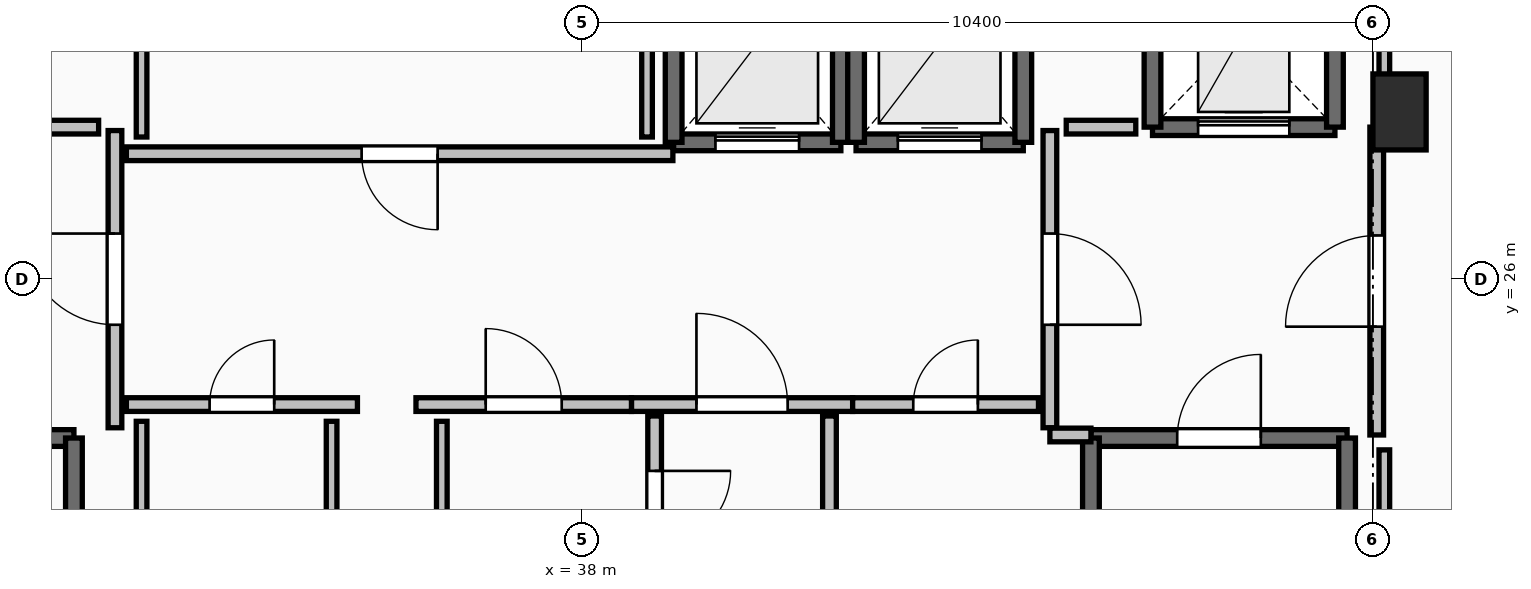
"""IFC4 building model, lengths in metres.
Left out: names, types, materials, properties, quantities, classifications, styles, units other than length and angle.
Written with IfcOpenShell. Run it as: python <this file> out.ifc"""

import sys

from ifc_helpers import new_model, si_unit, direction, frame, frame_2d, origin, origin_2d, place, context, subcontext, project, spatial, rectangle, extrude, element, fill, save


model = new_model("IFC4")
c1 = context("Model", 3, precision=1e-05, world=origin(), true_north=direction((0.0, 1.0)))
c2 = subcontext(c1, "Body", "Model", "MODEL_VIEW")
j1 = project(units=[si_unit("LENGTHUNIT", "METRE"), si_unit("PLANEANGLEUNIT", "RADIAN")], contexts=[c1])
p1 = place(None, origin())
s1 = spatial("IfcSite", under=j1, at=p1, CompositionType="ELEMENT")
p2 = place(p1, origin())
s2 = spatial("IfcBuilding", under=s1, at=p2, CompositionType="ELEMENT")
p3 = place(p2, frame((0.0, 0.0, 269.75)))
s3 = spatial("IfcBuildingStorey", under=s2, at=p3, CompositionType="ELEMENT", Elevation=269.75)
p4 = place(p3, frame((48.75, 28.2, 0.0), z_axis=(0.0, 0.0, 1.0), x_axis=(1.0, 0.0, 0.0)))
e1 = element("IfcColumn", 1, at=p4, inside=s3, PredefinedType="PILASTER", context=c2, shape_type="SweptSolid", body=[
    extrude(rectangle(XDim=0.7, YDim=1.0, at=origin_2d()), origin(), (0.0, 0.0, 1.0), 3.55),
])
p5 = place(p3, frame((27.94, 23.91, 0.0), z_axis=(0.0, 0.0, 1.0), x_axis=(1.0, 0.0, 0.0)))
e2 = element("IfcWall", 2, at=p5, inside=s3, PredefinedType="SOLIDWALL", context=c2, shape_type="SweptSolid", body=[
    extrude(rectangle(XDim=3.37, YDim=0.22, at=frame_2d((1.685, 0.0))), origin(), (0.0, 0.0, 1.0), 3.29),
])
p6 = place(p5, frame((1.135, 0.0, 0.0)))
e3 = element("IfcOpeningElement", 3, at=p6, cuts=e2, PredefinedType="OPENING", context=c2, shape_type="SweptSolid", body=[
    extrude(rectangle(XDim=1.1, YDim=2.15, at=frame_2d((0.55, 1.075))), frame((0.0, 0.125, 0.0), z_axis=(0.0, -1.0, 0.0), x_axis=(1.0, 0.0, 0.0)), (0.0, 0.0, 1.0), 0.25),
])
p7 = place(p3, frame((31.31, 23.91, 0.0), z_axis=(0.0, 0.0, 1.0), x_axis=(0.0, -1.0, 0.0)))
e4 = element("IfcWall", 4, at=p7, inside=s3, PredefinedType="SOLIDWALL", context=c2, shape_type="SweptSolid", body=[
    extrude(rectangle(XDim=7.42, YDim=0.22, at=frame_2d((3.71, 0.0))), origin(), (0.0, 0.0, 1.0), 3.29),
])
p8 = place(p3, frame((44.69, 23.91, 0.0), z_axis=(0.0, 0.0, 1.0), x_axis=(1.0, 0.0, 0.0)))
e5 = element("IfcWall", 5, at=p8, inside=s3, PredefinedType="SOLIDWALL", context=c2, shape_type="SweptSolid", body=[
    extrude(rectangle(XDim=3.37, YDim=0.22, at=frame_2d((1.685, 0.0))), origin(), (0.0, 0.0, 1.0), 3.29),
])
p9 = place(p8, frame((1.135, 0.0, 0.0)))
e6 = element("IfcOpeningElement", 6, at=p9, cuts=e5, PredefinedType="OPENING", context=c2, shape_type="SweptSolid", body=[
    extrude(rectangle(XDim=1.1, YDim=2.15, at=frame_2d((0.55, 1.075))), frame((0.0, 0.125, 0.0), z_axis=(0.0, -1.0, 0.0), x_axis=(1.0, 0.0, 0.0)), (0.0, 0.0, 1.0), 0.25),
])
for number, where, z_axis, x_axis in (
    (7, (48.06, 23.91, 0.0), (0.0, 0.0, 1.0), (0.0, -1.0, 0.0)),
    (8, (44.69, 16.49, 0.0), (0.0, 0.0, 1.0), (0.0, 1.0, 0.0)),
):
    element("IfcWall", number, at=place(p3, frame(where, z_axis=z_axis, x_axis=x_axis)), inside=s3, PredefinedType="SOLIDWALL", context=c2, shape_type="SweptSolid", body=[
        extrude(rectangle(XDim=7.42, YDim=0.22, at=frame_2d((3.71, 0.0))), origin(), (0.0, 0.0, 1.0), 3.29),
    ])
p10 = place(p3, frame((39.2, 27.8, 0.0), z_axis=(0.0, 0.0, 1.0), x_axis=(1.0, 0.0, 0.0)))
e9 = element("IfcWall", 9, at=p10, inside=s3, PredefinedType="SOLIDWALL", context=c2, shape_type="SweptSolid", body=[
    extrude(rectangle(XDim=2.2, YDim=0.22, at=frame_2d((1.1, 0.0))), origin(), (0.0, 0.0, 1.0), 3.29),
])
p11 = place(p10, frame((0.55, 0.0, 0.0)))
e10 = element("IfcOpeningElement", 10, at=p11, cuts=e9, PredefinedType="OPENING", context=c2, shape_type="SweptSolid", body=[
    extrude(rectangle(XDim=1.1, YDim=2.2, at=frame_2d((0.55, 1.1))), frame((0.0, 0.125, 0.0), z_axis=(0.0, -1.0, 0.0), x_axis=(1.0, 0.0, 0.0)), (0.0, 0.0, 1.0), 0.25),
])
for number, where, z_axis, x_axis in (
    (11, (41.4, 27.8, 0.0), (0.0, 0.0, 1.0), (0.0, 1.0, 0.0)),
    (12, (39.2, 30.4, 0.0), (0.0, 0.0, 1.0), (0.0, -1.0, 0.0)),
):
    element("IfcWall", number, at=place(p3, frame(where, z_axis=z_axis, x_axis=x_axis)), inside=s3, PredefinedType="SOLIDWALL", context=c2, shape_type="SweptSolid", body=[
        extrude(rectangle(XDim=2.6, YDim=0.22, at=frame_2d((1.3, 0.0))), origin(), (0.0, 0.0, 1.0), 3.29),
    ])
p12 = place(p3, frame((41.6, 27.8, 0.0), z_axis=(0.0, 0.0, 1.0), x_axis=(1.0, 0.0, 0.0)))
e13 = element("IfcWall", 13, at=p12, inside=s3, PredefinedType="SOLIDWALL", context=c2, shape_type="SweptSolid", body=[
    extrude(rectangle(XDim=2.2, YDim=0.22, at=frame_2d((1.1, 0.0))), origin(), (0.0, 0.0, 1.0), 3.29),
])
p13 = place(p12, frame((0.55, 0.0, 0.0)))
e14 = element("IfcOpeningElement", 14, at=p13, cuts=e13, PredefinedType="OPENING", context=c2, shape_type="SweptSolid", body=[
    extrude(rectangle(XDim=1.1, YDim=2.2, at=frame_2d((0.55, 1.1))), frame((0.0, 0.125, 0.0), z_axis=(0.0, -1.0, 0.0), x_axis=(1.0, 0.0, 0.0)), (0.0, 0.0, 1.0), 0.25),
])
for number, where, z_axis, x_axis in (
    (15, (43.8, 27.8, 0.0), (0.0, 0.0, 1.0), (0.0, 1.0, 0.0)),
    (16, (41.6, 30.4, 0.0), (0.0, 0.0, 1.0), (0.0, -1.0, 0.0)),
):
    element("IfcWall", number, at=place(p3, frame(where, z_axis=z_axis, x_axis=x_axis)), inside=s3, PredefinedType="SOLIDWALL", context=c2, shape_type="SweptSolid", body=[
        extrude(rectangle(XDim=2.6, YDim=0.22, at=frame_2d((1.3, 0.0))), origin(), (0.0, 0.0, 1.0), 3.29),
    ])
p14 = place(p3, frame((45.5, 28.0, 0.0), z_axis=(0.0, 0.0, 1.0), x_axis=(1.0, 0.0, 0.0)))
e17 = element("IfcWall", 17, at=p14, inside=s3, PredefinedType="SHEAR", context=c2, shape_type="SweptSolid", body=[
    extrude(rectangle(XDim=2.4, YDim=0.22, at=frame_2d((1.2, 0.0))), origin(), (0.0, 0.0, 1.0), 3.29),
])
p15 = place(p14, frame((0.6, 0.0, 0.0)))
e18 = element("IfcOpeningElement", 18, at=p15, cuts=e17, PredefinedType="OPENING", context=c2, shape_type="SweptSolid", body=[
    extrude(rectangle(XDim=1.2, YDim=2.2, at=frame_2d((0.6, 1.1))), frame((0.0, 0.125, 0.0), z_axis=(0.0, -1.0, 0.0), x_axis=(1.0, 0.0, 0.0)), (0.0, 0.0, 1.0), 0.25),
])
for number, where, z_axis, x_axis in (
    (19, (47.9, 28.0, 0.0), (0.0, 0.0, 1.0), (0.0, 1.0, 0.0)),
    (20, (45.5, 30.5, 0.0), (0.0, 0.0, 1.0), (0.0, -1.0, 0.0)),
):
    element("IfcWall", number, at=place(p3, frame(where, z_axis=z_axis, x_axis=x_axis)), inside=s3, PredefinedType="SHEAR", context=c2, shape_type="SweptSolid", body=[
        extrude(rectangle(XDim=2.5, YDim=0.22, at=frame_2d((1.25, 0.0))), origin(), (0.0, 0.0, 1.0), 3.29),
    ])
p16 = place(p3, frame((31.85, 24.045, 0.0), z_axis=(0.0, 0.0, 1.0), x_axis=(0.0, 1.0, 0.0)))
e21 = element("IfcWall", 21, at=p16, inside=s3, PredefinedType="PARTITIONING", context=c2, shape_type="SweptSolid", body=[
    extrude(rectangle(XDim=3.91, YDim=0.18, at=frame_2d((1.955, 0.0))), origin(), (0.0, 0.0, 1.0), 3.29),
])
p17 = place(p16, frame((1.355, 0.0, 0.0)))
e22 = element("IfcOpeningElement", 22, at=p17, cuts=e21, PredefinedType="OPENING", context=c2, shape_type="SweptSolid", body=[
    extrude(rectangle(XDim=1.2, YDim=2.15, at=frame_2d((0.6, 1.075))), frame((0.0, 0.105, 0.0), z_axis=(0.0, -1.0, 0.0), x_axis=(1.0, 0.0, 0.0)), (0.0, 0.0, 1.0), 0.21),
])
p18 = place(p3, frame((44.15, 27.955, 0.0), z_axis=(0.0, 0.0, 1.0), x_axis=(0.0, -1.0, 0.0)))
e23 = element("IfcWall", 23, at=p18, inside=s3, PredefinedType="PARTITIONING", context=c2, shape_type="SweptSolid", body=[
    extrude(rectangle(XDim=3.91, YDim=0.18, at=frame_2d((1.955, 0.0))), origin(), (0.0, 0.0, 1.0), 3.29),
])
p19 = place(p18, frame((1.355, 0.0, 0.0)))
e24 = element("IfcOpeningElement", 24, at=p19, cuts=e23, PredefinedType="OPENING", context=c2, shape_type="SweptSolid", body=[
    extrude(rectangle(XDim=1.2, YDim=2.15, at=frame_2d((0.6, 1.075))), frame((0.0, 0.105, 0.0), z_axis=(0.0, -1.0, 0.0), x_axis=(1.0, 0.0, 0.0)), (0.0, 0.0, 1.0), 0.21),
])
p20 = place(p3, frame((44.15, 23.95, 0.0), z_axis=(0.0, 0.0, 1.0), x_axis=(1.0, 0.0, 0.0)))
e25 = element("IfcWall", 25, at=p20, inside=s3, PredefinedType="PARTITIONING", context=c2, shape_type="SweptSolid", body=[
    extrude(rectangle(XDim=0.54, YDim=0.18, at=frame_2d((0.27, 0.0))), origin(), (0.0, 0.0, 1.0), 3.29),
])
p21 = place(p3, frame((48.45, 23.95, 0.0), z_axis=(0.0, 0.0, 1.0), x_axis=(0.0, 1.0, 0.0)))
e26 = element("IfcWall", 26, at=p21, inside=s3, PredefinedType="PARTITIONING", context=c2, shape_type="SweptSolid", body=[
    extrude(rectangle(XDim=4.05, YDim=0.18, at=frame_2d((2.025, 0.0))), origin(), (0.0, 0.0, 1.0), 3.29),
])
p22 = place(p21, frame((1.425, 0.0, 0.0)))
e27 = element("IfcOpeningElement", 27, at=p22, cuts=e26, PredefinedType="OPENING", context=c2, shape_type="SweptSolid", body=[
    extrude(rectangle(XDim=1.2, YDim=2.15, at=frame_2d((0.6, 1.075))), frame((0.0, 0.105, 0.0), z_axis=(0.0, -1.0, 0.0), x_axis=(1.0, 0.0, 0.0)), (0.0, 0.0, 1.0), 0.21),
])
p23 = place(p3, frame((38.645, 24.35, 0.0), z_axis=(0.0, 0.0, 1.0), x_axis=(1.0, 0.0, 0.0)))
e28 = element("IfcWall", 28, at=p23, inside=s3, PredefinedType="PARTITIONING", context=c2, shape_type="SweptSolid", body=[
    extrude(rectangle(XDim=2.91, YDim=0.18, at=frame_2d((1.455, 0.0))), origin(), (0.0, 0.0, 1.0), 3.29),
])
p24 = place(p23, frame((0.855, 0.0, 0.0)))
e29 = element("IfcOpeningElement", 29, at=p24, cuts=e28, PredefinedType="OPENING", context=c2, shape_type="SweptSolid", body=[
    extrude(rectangle(XDim=1.2, YDim=2.15, at=frame_2d((0.6, 1.075))), frame((0.0, 0.105, 0.0), z_axis=(0.0, -1.0, 0.0), x_axis=(1.0, 0.0, 0.0)), (0.0, 0.0, 1.0), 0.21),
])
p25 = place(p3, frame((41.555, 24.35, 0.0), z_axis=(0.0, 0.0, 1.0), x_axis=(1.0, 0.0, 0.0)))
e30 = element("IfcWall", 30, at=p25, inside=s3, PredefinedType="PARTITIONING", context=c2, shape_type="SweptSolid", body=[
    extrude(rectangle(XDim=2.445, YDim=0.18, at=frame_2d((1.223, 0.0))), origin(), (0.0, 0.0, 1.0), 3.29),
])
p26 = place(p25, frame((0.798, 0.0, 0.0)))
e31 = element("IfcOpeningElement", 31, at=p26, cuts=e30, PredefinedType="OPENING", context=c2, shape_type="SweptSolid", body=[
    extrude(rectangle(XDim=0.85, YDim=2.1, at=frame_2d((0.425, 1.05))), frame((0.0, 0.105, 0.0), z_axis=(0.0, -1.0, 0.0), x_axis=(1.0, 0.0, 0.0)), (0.0, 0.0, 1.0), 0.21),
])
p27 = place(p3, frame((39.19, 27.65, 0.0), z_axis=(0.0, 0.0, 1.0), x_axis=(-1.0, 0.0, 0.0)))
e32 = element("IfcWall", 32, at=p27, inside=s3, PredefinedType="PARTITIONING", context=c2, shape_type="SweptSolid", body=[
    extrude(rectangle(XDim=7.19, YDim=0.18, at=frame_2d((3.595, 0.0))), origin(), (0.0, 0.0, 1.0), 3.29),
])
p28 = place(p27, frame((3.095, 0.0, 0.0)))
e33 = element("IfcOpeningElement", 33, at=p28, cuts=e32, PredefinedType="OPENING", context=c2, shape_type="SweptSolid", body=[
    extrude(rectangle(XDim=1.0, YDim=2.15, at=frame_2d((0.5, 1.075))), frame((0.0, 0.105, 0.0), z_axis=(0.0, -1.0, 0.0), x_axis=(1.0, 0.0, 0.0)), (0.0, 0.0, 1.0), 0.21),
])
p29 = place(p3, frame((32.0, 24.35, 0.0), z_axis=(0.0, 0.0, 1.0), x_axis=(1.0, 0.0, 0.0)))
e34 = element("IfcWall", 34, at=p29, inside=s3, PredefinedType="PARTITIONING", context=c2, shape_type="SweptSolid", body=[
    extrude(rectangle(XDim=3.04, YDim=0.18, at=frame_2d((1.52, 0.0))), origin(), (0.0, 0.0, 1.0), 3.29),
])
p30 = place(p29, frame((1.095, 0.0, 0.0)))
e35 = element("IfcOpeningElement", 35, at=p30, cuts=e34, PredefinedType="OPENING", context=c2, shape_type="SweptSolid", body=[
    extrude(rectangle(XDim=0.85, YDim=2.1, at=frame_2d((0.425, 1.05))), frame((0.0, 0.105, 0.0), z_axis=(0.0, -1.0, 0.0), x_axis=(1.0, 0.0, 0.0)), (0.0, 0.0, 1.0), 0.21),
])
p31 = place(p3, frame((35.81, 24.35, 0.0), z_axis=(0.0, 0.0, 1.0), x_axis=(1.0, 0.0, 0.0)))
e36 = element("IfcWall", 36, at=p31, inside=s3, PredefinedType="PARTITIONING", context=c2, shape_type="SweptSolid", body=[
    extrude(rectangle(XDim=2.835, YDim=0.18, at=frame_2d((1.417, 0.0))), origin(), (0.0, 0.0, 1.0), 3.29),
])
p32 = place(p31, frame((0.917, 0.0, 0.0)))
e37 = element("IfcOpeningElement", 37, at=p32, cuts=e36, PredefinedType="OPENING", context=c2, shape_type="SweptSolid", body=[
    extrude(rectangle(XDim=1.0, YDim=2.15, at=frame_2d((0.5, 1.075))), frame((0.0, 0.105, 0.0), z_axis=(0.0, -1.0, 0.0), x_axis=(1.0, 0.0, 0.0)), (0.0, 0.0, 1.0), 0.21),
])
p33 = place(p3, frame((41.25, 20.305, 0.0), z_axis=(0.0, 0.0, 1.0), x_axis=(0.0, 1.0, 0.0)))
e38 = element("IfcWall", 38, at=p33, inside=s3, PredefinedType="PARTITIONING", context=c2, shape_type="SweptSolid", body=[
    extrude(rectangle(XDim=3.895, YDim=0.18, at=frame_2d((1.948, 0.0))), origin(), (0.0, 0.0, 1.0), 2.482),
])
p34 = place(p33, frame((1.522, 0.0, 0.0)))
e39 = element("IfcOpeningElement", 39, at=p34, cuts=e38, PredefinedType="OPENING", context=c2, shape_type="SweptSolid", body=[
    extrude(rectangle(XDim=0.85, YDim=2.1, at=frame_2d((0.425, 1.05))), frame((0.0, 0.105, 0.0), z_axis=(0.0, -1.0, 0.0), x_axis=(1.0, 0.0, 0.0)), (0.0, 0.0, 1.0), 0.21),
])
p35 = place(p3, frame((38.95, 24.2, 0.0), z_axis=(0.0, 0.0, 1.0), x_axis=(0.0, -1.0, 0.0)))
e40 = element("IfcWall", 40, at=p35, inside=s3, PredefinedType="PARTITIONING", context=c2, shape_type="SweptSolid", body=[
    extrude(rectangle(XDim=2.445, YDim=0.18, at=frame_2d((1.223, 0.0))), origin(), (0.0, 0.0, 1.0), 2.482),
])
p36 = place(p35, frame((0.722, 0.0, 0.0)))
e41 = element("IfcOpeningElement", 41, at=p36, cuts=e40, PredefinedType="OPENING", context=c2, shape_type="SweptSolid", body=[
    extrude(rectangle(XDim=1.0, YDim=2.15, at=frame_2d((0.5, 1.075))), frame((0.0, 0.105, 0.0), z_axis=(0.0, -1.0, 0.0), x_axis=(1.0, 0.0, 0.0)), (0.0, 0.0, 1.0), 0.21),
])
for number, where, z_axis, x_axis in (
    (42, (31.635, 28.0, 0.0), (0.0, 0.0, 1.0), (-1.0, 0.0, 0.0)),
    (43, (45.28, 28.0, 0.0), (0.0, 0.0, 1.0), (-1.0, 0.0, 0.0)),
):
    element("IfcWall", number, at=place(p3, frame(where, z_axis=z_axis, x_axis=x_axis)), inside=s3, PredefinedType="PARTITIONING", context=c2, shape_type="SweptSolid", body=[
        extrude(rectangle(XDim=0.915, YDim=0.18, at=frame_2d((0.458, 0.0))), origin(), (0.0, 0.0, 1.0), 3.29),
    ])
for number, where, z_axis, x_axis in (
    (44, (32.2, 30.26, 0.0), (0.0, 0.0, 1.0), (0.0, -1.0, 0.0)),
    (45, (38.85, 27.87, 0.0), (0.0, 0.0, 1.0), (0.0, 1.0, 0.0)),
):
    element("IfcWall", number, at=place(p3, frame(where, z_axis=z_axis, x_axis=x_axis)), inside=s3, PredefinedType="PARTITIONING", context=c2, shape_type="SweptSolid", body=[
        extrude(rectangle(XDim=2.39, YDim=0.14, at=frame_2d((1.195, 0.0))), origin(), (0.0, 0.0, 1.0), 3.29),
    ])
for number, where, z_axis, x_axis in (
    (46, (32.2, 24.13, 0.0), (0.0, 0.0, 1.0), (0.0, -1.0, 0.0)),
    (47, (34.7, 21.67, 0.0), (0.0, 0.0, 1.0), (0.0, 1.0, 0.0)),
    (48, (36.15, 24.13, 0.0), (0.0, 0.0, 1.0), (0.0, -1.0, 0.0)),
):
    element("IfcWall", number, at=place(p3, frame(where, z_axis=z_axis, x_axis=x_axis)), inside=s3, PredefinedType="PARTITIONING", context=c2, shape_type="SweptSolid", body=[
        extrude(rectangle(XDim=2.46, YDim=0.14, at=frame_2d((1.23, 0.0))), origin(), (0.0, 0.0, 1.0), 2.482),
    ])
p37 = place(p3, frame((48.55, 16.24, 0.0), z_axis=(0.0, 0.0, 1.0), x_axis=(0.0, 1.0, 0.0)))
e49 = element("IfcWall", 49, at=p37, inside=s3, PredefinedType="PARTITIONING", context=c2, shape_type="SweptSolid", body=[
    extrude(rectangle(XDim=7.514, YDim=0.14, at=frame_2d((3.757, 0.0))), origin(), (0.0, 0.0, 1.0), 2.482),
])
p38 = place(p3, frame((48.55, 28.196, 0.0), z_axis=(0.0, 0.0, 1.0), x_axis=(0.0, 1.0, 0.0)))
e50 = element("IfcWall", 50, at=p38, inside=s3, PredefinedType="PARTITIONING", context=c2, shape_type="SweptSolid", body=[
    extrude(rectangle(XDim=5.254, YDim=0.14, at=frame_2d((2.627, 0.0))), origin(), (0.0, 0.0, 1.0), 2.482),
])
p39 = place(p9, origin())
e51 = element("IfcDoor", 51, at=p39, inside=s3, OperationType="SINGLE_SWING_RIGHT", PredefinedType="DOOR", context=c2, shape_type="SweptSolid", body=[
    extrude(rectangle(XDim=1.1, YDim=2.15, at=frame_2d((0.55, 1.075))), frame((0.0, 0.025, 0.0), z_axis=(0.0, -1.0, 0.0), x_axis=(1.0, 0.0, 0.0)), (0.0, 0.0, 1.0), 0.05),
])
fill(e6, e51)
p40 = place(p11, origin())
e52 = element("IfcDoor", 52, at=p40, inside=s3, OperationType="SLIDING_TO_LEFT", PredefinedType="DOOR", context=c2, shape_type="SweptSolid", body=[
    extrude(rectangle(XDim=1.1, YDim=2.2, at=frame_2d((0.55, 1.1))), frame((0.0, 0.025, 0.0), z_axis=(0.0, -1.0, 0.0), x_axis=(1.0, 0.0, 0.0)), (0.0, 0.0, 1.0), 0.05),
])
fill(e10, e52)
p41 = place(p13, origin())
e53 = element("IfcDoor", 53, at=p41, inside=s3, OperationType="SLIDING_TO_LEFT", PredefinedType="DOOR", context=c2, shape_type="SweptSolid", body=[
    extrude(rectangle(XDim=1.1, YDim=2.2, at=frame_2d((0.55, 1.1))), frame((0.0, 0.025, 0.0), z_axis=(0.0, -1.0, 0.0), x_axis=(1.0, 0.0, 0.0)), (0.0, 0.0, 1.0), 0.05),
])
fill(e14, e53)
p42 = place(p15, origin())
e54 = element("IfcDoor", 54, at=p42, inside=s3, OperationType="SLIDING_TO_LEFT", PredefinedType="DOOR", context=c2, shape_type="SweptSolid", body=[
    extrude(rectangle(XDim=1.2, YDim=2.2, at=frame_2d((0.6, 1.1))), frame((0.0, 0.025, 0.0), z_axis=(0.0, -1.0, 0.0), x_axis=(1.0, 0.0, 0.0)), (0.0, 0.0, 1.0), 0.05),
])
fill(e18, e54)
p43 = place(p17, origin())
e55 = element("IfcDoor", 55, at=p43, inside=s3, OperationType="SINGLE_SWING_RIGHT", PredefinedType="DOOR", context=c2, shape_type="SweptSolid", body=[
    extrude(rectangle(XDim=1.2, YDim=2.15, at=frame_2d((0.6, 1.075))), frame((0.0, 0.025, 0.0), z_axis=(0.0, -1.0, 0.0), x_axis=(1.0, 0.0, 0.0)), (0.0, 0.0, 1.0), 0.05),
])
fill(e22, e55)
p44 = place(p19, origin())
e56 = element("IfcDoor", 56, at=p44, inside=s3, OperationType="SINGLE_SWING_RIGHT", PredefinedType="DOOR", context=c2, shape_type="SweptSolid", body=[
    extrude(rectangle(XDim=1.2, YDim=2.15, at=frame_2d((0.6, 1.075))), frame((0.0, 0.025, 0.0), z_axis=(0.0, -1.0, 0.0), x_axis=(1.0, 0.0, 0.0)), (0.0, 0.0, 1.0), 0.05),
])
fill(e24, e56)
p45 = place(p22, origin())
e57 = element("IfcDoor", 57, at=p45, inside=s3, OperationType="SINGLE_SWING_LEFT", PredefinedType="DOOR", context=c2, shape_type="SweptSolid", body=[
    extrude(rectangle(XDim=1.2, YDim=2.15, at=frame_2d((0.6, 1.075))), frame((0.0, 0.025, 0.0), z_axis=(0.0, -1.0, 0.0), x_axis=(1.0, 0.0, 0.0)), (0.0, 0.0, 1.0), 0.05),
])
fill(e27, e57)
p46 = place(p24, origin())
e58 = element("IfcDoor", 58, at=p46, inside=s3, OperationType="SINGLE_SWING_LEFT", PredefinedType="DOOR", context=c2, shape_type="SweptSolid", body=[
    extrude(rectangle(XDim=1.2, YDim=2.15, at=frame_2d((0.6, 1.075))), frame((0.0, 0.025, 0.0), z_axis=(0.0, -1.0, 0.0), x_axis=(1.0, 0.0, 0.0)), (0.0, 0.0, 1.0), 0.05),
])
fill(e29, e58)
p47 = place(p26, origin())
e59 = element("IfcDoor", 59, at=p47, inside=s3, OperationType="SINGLE_SWING_RIGHT", PredefinedType="DOOR", context=c2, shape_type="SweptSolid", body=[
    extrude(rectangle(XDim=0.85, YDim=2.1, at=frame_2d((0.425, 1.05))), frame((0.0, 0.025, 0.0), z_axis=(0.0, -1.0, 0.0), x_axis=(1.0, 0.0, 0.0)), (0.0, 0.0, 1.0), 0.05),
])
fill(e31, e59)
p48 = place(p28, origin())
e60 = element("IfcDoor", 60, at=p48, inside=s3, OperationType="SINGLE_SWING_LEFT", PredefinedType="DOOR", context=c2, shape_type="SweptSolid", body=[
    extrude(rectangle(XDim=1.0, YDim=2.15, at=frame_2d((0.5, 1.075))), frame((0.0, 0.025, 0.0), z_axis=(0.0, -1.0, 0.0), x_axis=(1.0, 0.0, 0.0)), (0.0, 0.0, 1.0), 0.05),
])
fill(e33, e60)
p49 = place(p30, origin())
e61 = element("IfcDoor", 61, at=p49, inside=s3, OperationType="SINGLE_SWING_RIGHT", PredefinedType="DOOR", context=c2, shape_type="SweptSolid", body=[
    extrude(rectangle(XDim=0.85, YDim=2.1, at=frame_2d((0.425, 1.05))), frame((0.0, 0.025, 0.0), z_axis=(0.0, -1.0, 0.0), x_axis=(1.0, 0.0, 0.0)), (0.0, 0.0, 1.0), 0.05),
])
fill(e35, e61)
p50 = place(p32, origin())
e62 = element("IfcDoor", 62, at=p50, inside=s3, OperationType="SINGLE_SWING_LEFT", PredefinedType="DOOR", context=c2, shape_type="SweptSolid", body=[
    extrude(rectangle(XDim=1.0, YDim=2.15, at=frame_2d((0.5, 1.075))), frame((0.0, 0.025, 0.0), z_axis=(0.0, -1.0, 0.0), x_axis=(1.0, 0.0, 0.0)), (0.0, 0.0, 1.0), 0.05),
])
fill(e37, e62)
p51 = place(p36, origin())
e63 = element("IfcDoor", 63, at=p51, inside=s3, OperationType="SINGLE_SWING_LEFT", PredefinedType="DOOR", context=c2, shape_type="SweptSolid", body=[
    extrude(rectangle(XDim=1.0, YDim=2.15, at=frame_2d((0.5, 1.075))), frame((0.0, 0.025, 0.0), z_axis=(0.0, -1.0, 0.0), x_axis=(1.0, 0.0, 0.0)), (0.0, 0.0, 1.0), 0.05),
])
fill(e41, e63)
save(model, sys.argv[1])
